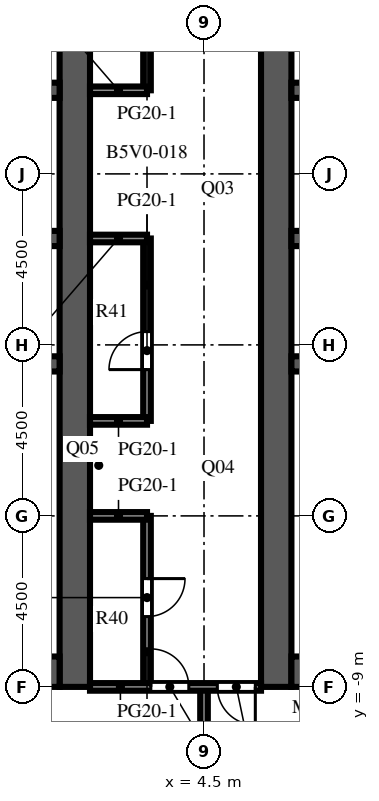
"""IFC4 building model, lengths in metres.
Left out: names, types, materials, properties, quantities, classifications, styles, units other than length and angle.
Written with IfcOpenShell. Run it as: python <this file> out.ifc"""

import sys

from ifc_helpers import new_model, si_unit, direction, frame, frame_2d, origin, place, context, subcontext, project, spatial, rectangle, extrude, element, fill, save


model = new_model("IFC4")
c1 = context("Model", 3, precision=1e-05, world=origin(), true_north=direction((0.0, 1.0)))
c2 = subcontext(c1, "Body", "Model", "MODEL_VIEW")
j1 = project(units=[si_unit("LENGTHUNIT", "METRE"), si_unit("PLANEANGLEUNIT", "RADIAN")], contexts=[c1])
p1 = place(None, origin())
s1 = spatial("IfcSite", under=j1, at=p1, CompositionType="ELEMENT")
p2 = place(p1, origin())
s2 = spatial("IfcBuilding", under=s1, at=p2, CompositionType="ELEMENT")
p3 = place(p2, frame((0.0, 0.0, 160.9)))
s3 = spatial("IfcBuildingStorey", under=s2, at=p3, CompositionType="ELEMENT", Elevation=160.9)
p4 = place(p3, frame((1.1, -9.0, 0.0), z_axis=(0.0, 0.0, 1.0), x_axis=(0.0, 1.0, 0.0)))
e1 = element("IfcWall", 1, at=p4, inside=s3, PredefinedType="SHEAR", context=c2, shape_type="SweptSolid", body=[
    extrude(rectangle(XDim=27.5, YDim=0.8, at=frame_2d((13.75, 0.0))), origin(), (0.0, 0.0, 1.0), 4.1),
])
p5 = place(p4, frame((12.55, 0.0, 0.0)))
e2 = element("IfcOpeningElement", 2, at=p5, cuts=e1, PredefinedType="OPENING", context=c2, shape_type="SweptSolid", body=[
    extrude(rectangle(XDim=2.4, YDim=2.4, at=frame_2d((1.2, 1.2))), frame((0.0, 0.41, 0.0), z_axis=(0.0, -1.0, 0.0), x_axis=(1.0, 0.0, 0.0)), (0.0, 0.0, 1.0), 0.82),
])
p6 = place(p4, frame((5.45, 0.0, 0.0)))
e3 = element("IfcOpeningElement", 3, at=p6, cuts=e1, PredefinedType="OPENING", context=c2, shape_type="SweptSolid", body=[
    extrude(rectangle(XDim=1.2, YDim=2.1, at=frame_2d((0.6, 1.05))), frame((0.0, 0.41, 0.0), z_axis=(0.0, -1.0, 0.0), x_axis=(1.0, 0.0, 0.0)), (0.0, 0.0, 1.0), 0.82),
])
p7 = place(p4, frame((19.45, 0.0, 0.0)))
e4 = element("IfcOpeningElement", 4, at=p7, cuts=e1, PredefinedType="OPENING", context=c2, shape_type="SweptSolid", body=[
    extrude(rectangle(XDim=1.0, YDim=2.1, at=frame_2d((0.5, 1.05))), frame((0.0, 0.41, 0.0), z_axis=(0.0, -1.0, 0.0), x_axis=(1.0, 0.0, 0.0)), (0.0, 0.0, 1.0), 0.82),
])
p8 = place(p4, frame((21.137, 0.0, 0.0)))
e5 = element("IfcOpeningElement", 5, at=p8, cuts=e1, PredefinedType="OPENING", context=c2, shape_type="SweptSolid", body=[
    extrude(rectangle(XDim=1.0, YDim=2.1, at=frame_2d((0.5, 1.05))), frame((0.0, 0.41, 0.0), z_axis=(0.0, -1.0, 0.0), x_axis=(1.0, 0.0, 0.0)), (0.0, 0.0, 1.0), 0.82),
])
p9 = place(p4, frame((23.2, 0.0, 0.0)))
e6 = element("IfcOpeningElement", 6, at=p9, cuts=e1, PredefinedType="OPENING", context=c2, shape_type="SweptSolid", body=[
    extrude(rectangle(XDim=1.0, YDim=2.1, at=frame_2d((0.5, 1.05))), frame((0.0, 0.41, 0.0), z_axis=(0.0, -1.0, 0.0), x_axis=(1.0, 0.0, 0.0)), (0.0, 0.0, 1.0), 0.82),
])
p10 = place(p4, frame((25.262, 0.0, 0.0)))
e7 = element("IfcOpeningElement", 7, at=p10, cuts=e1, PredefinedType="OPENING", context=c2, shape_type="SweptSolid", body=[
    extrude(rectangle(XDim=1.0, YDim=2.1, at=frame_2d((0.5, 1.05))), frame((0.0, 0.41, 0.0), z_axis=(0.0, -1.0, 0.0), x_axis=(1.0, 0.0, 0.0)), (0.0, 0.0, 1.0), 0.82),
])
p11 = place(p3, frame((-9.7, -8.6, 0.0), z_axis=(0.0, 0.0, 1.0), x_axis=(1.0, 0.0, 0.0)))
e8 = element("IfcWall", 8, at=p11, inside=s3, PredefinedType="SHEAR", context=c2, shape_type="SweptSolid", body=[
    extrude(rectangle(XDim=10.4, YDim=0.8, at=frame_2d((5.2, 0.0))), origin(), (0.0, 0.0, 1.0), 4.1),
])
p12 = place(p3, frame((-9.7, -0.5, 0.0), z_axis=(0.0, 0.0, 1.0), x_axis=(1.0, 0.0, 0.0)))
e9 = element("IfcWall", 9, at=p12, inside=s3, PredefinedType="SHEAR", context=c2, shape_type="SweptSolid", body=[
    extrude(rectangle(XDim=10.4, YDim=0.4, at=frame_2d((5.2, 0.0))), origin(), (0.0, 0.0, 1.0), 4.1),
])
p13 = place(p3, frame((-9.7, 2.8, 0.0), z_axis=(0.0, 0.0, 1.0), x_axis=(1.0, 0.0, 0.0)))
e10 = element("IfcWall", 10, at=p13, inside=s3, PredefinedType="SHEAR", context=c2, shape_type="SweptSolid", body=[
    extrude(rectangle(XDim=10.4, YDim=0.4, at=frame_2d((5.2, 0.0))), origin(), (0.0, 0.0, 1.0), 4.1),
])
p14 = place(p13, frame((0.738, 0.0, 0.0)))
e11 = element("IfcOpeningElement", 11, at=p14, cuts=e10, PredefinedType="OPENING", context=c2, shape_type="SweptSolid", body=[
    extrude(rectangle(XDim=1.1, YDim=2.1, at=frame_2d((0.55, 1.05))), frame((0.0, 0.21, 0.0), z_axis=(0.0, -1.0, 0.0), x_axis=(1.0, 0.0, 0.0)), (0.0, 0.0, 1.0), 0.42),
])
p15 = place(p13, frame((3.337, 0.0, 0.0)))
e12 = element("IfcOpeningElement", 12, at=p15, cuts=e10, PredefinedType="OPENING", context=c2, shape_type="SweptSolid", body=[
    extrude(rectangle(XDim=1.1, YDim=2.1, at=frame_2d((0.55, 1.05))), frame((0.0, 0.21, 0.0), z_axis=(0.0, -1.0, 0.0), x_axis=(1.0, 0.0, 0.0)), (0.0, 0.0, 1.0), 0.42),
])
p16 = place(p13, frame((6.012, 0.0, 0.0)))
e13 = element("IfcOpeningElement", 13, at=p16, cuts=e10, PredefinedType="OPENING", context=c2, shape_type="SweptSolid", body=[
    extrude(rectangle(XDim=1.0, YDim=2.1, at=frame_2d((0.5, 1.05))), frame((0.0, 0.21, 0.0), z_axis=(0.0, -1.0, 0.0), x_axis=(1.0, 0.0, 0.0)), (0.0, 0.0, 1.0), 0.42),
])
p17 = place(p13, frame((8.613, 0.0, 0.0)))
e14 = element("IfcOpeningElement", 14, at=p17, cuts=e10, PredefinedType="OPENING", context=c2, shape_type="SweptSolid", body=[
    extrude(rectangle(XDim=1.0, YDim=2.1, at=frame_2d((0.5, 1.05))), frame((0.0, 0.21, 0.0), z_axis=(0.0, -1.0, 0.0), x_axis=(1.0, 0.0, 0.0)), (0.0, 0.0, 1.0), 0.42),
])
p18 = place(p3, frame((-9.7, 6.7, 0.0), z_axis=(0.0, 0.0, 1.0), x_axis=(1.0, 0.0, 0.0)))
e15 = element("IfcWall", 15, at=p18, inside=s3, PredefinedType="SHEAR", context=c2, shape_type="SweptSolid", body=[
    extrude(rectangle(XDim=10.4, YDim=0.4, at=frame_2d((5.2, 0.0))), origin(), (0.0, 0.0, 1.0), 4.1),
])
p19 = place(p18, frame((3.337, 0.0, 0.0)))
e16 = element("IfcOpeningElement", 16, at=p19, cuts=e15, PredefinedType="OPENING", context=c2, shape_type="SweptSolid", body=[
    extrude(rectangle(XDim=1.1, YDim=2.1, at=frame_2d((0.55, 1.05))), frame((0.0, 0.21, 0.0), z_axis=(0.0, -1.0, 0.0), x_axis=(1.0, 0.0, 0.0)), (0.0, 0.0, 1.0), 0.42),
])
p20 = place(p18, frame((5.962, 0.0, 0.0)))
e17 = element("IfcOpeningElement", 17, at=p20, cuts=e15, PredefinedType="OPENING", context=c2, shape_type="SweptSolid", body=[
    extrude(rectangle(XDim=1.1, YDim=2.1, at=frame_2d((0.55, 1.05))), frame((0.0, 0.21, 0.0), z_axis=(0.0, -1.0, 0.0), x_axis=(1.0, 0.0, 0.0)), (0.0, 0.0, 1.0), 0.42),
])
p21 = place(p18, frame((8.663, 0.0, 0.0)))
e18 = element("IfcOpeningElement", 18, at=p21, cuts=e15, PredefinedType="OPENING", context=c2, shape_type="SweptSolid", body=[
    extrude(rectangle(XDim=1.1, YDim=2.1, at=frame_2d((0.55, 1.05))), frame((0.0, 0.21, 0.0), z_axis=(0.0, -1.0, 0.0), x_axis=(1.0, 0.0, 0.0)), (0.0, 0.0, 1.0), 0.42),
])
p22 = place(p18, frame((0.688, 0.0, 0.0)))
e19 = element("IfcOpeningElement", 19, at=p22, cuts=e15, PredefinedType="OPENING", context=c2, shape_type="SweptSolid", body=[
    extrude(rectangle(XDim=1.0, YDim=2.1, at=frame_2d((0.5, 1.05))), frame((0.0, 0.21, 0.0), z_axis=(0.0, -1.0, 0.0), x_axis=(1.0, 0.0, 0.0)), (0.0, 0.0, 1.0), 0.42),
])
p23 = place(p3, frame((6.4, -9.0, 0.0), z_axis=(0.0, 0.0, 1.0), x_axis=(0.0, 1.0, 0.0)))
e20 = element("IfcWall", 20, at=p23, inside=s3, PredefinedType="SHEAR", context=c2, shape_type="SweptSolid", body=[
    extrude(rectangle(XDim=27.5, YDim=0.8, at=frame_2d((13.75, 0.0))), origin(), (0.0, 0.0, 1.0), 4.1),
])
p24 = place(p23, frame((12.55, 0.0, 0.0)))
e21 = element("IfcOpeningElement", 21, at=p24, cuts=e20, PredefinedType="OPENING", context=c2, shape_type="SweptSolid", body=[
    extrude(rectangle(XDim=2.4, YDim=2.4, at=frame_2d((1.2, 1.2))), frame((0.0, 0.41, 0.0), z_axis=(0.0, -1.0, 0.0), x_axis=(1.0, 0.0, 0.0)), (0.0, 0.0, 1.0), 0.82),
])
p25 = place(p23, frame((5.45, 0.0, 0.0)))
e22 = element("IfcOpeningElement", 22, at=p25, cuts=e20, PredefinedType="OPENING", context=c2, shape_type="SweptSolid", body=[
    extrude(rectangle(XDim=1.2, YDim=2.1, at=frame_2d((0.6, 1.05))), frame((0.0, 0.41, 0.0), z_axis=(0.0, -1.0, 0.0), x_axis=(1.0, 0.0, 0.0)), (0.0, 0.0, 1.0), 0.82),
])
p26 = place(p23, frame((19.45, 0.0, 0.0)))
e23 = element("IfcOpeningElement", 23, at=p26, cuts=e20, PredefinedType="OPENING", context=c2, shape_type="SweptSolid", body=[
    extrude(rectangle(XDim=1.0, YDim=2.1, at=frame_2d((0.5, 1.05))), frame((0.0, 0.41, 0.0), z_axis=(0.0, -1.0, 0.0), x_axis=(1.0, 0.0, 0.0)), (0.0, 0.0, 1.0), 0.82),
])
p27 = place(p23, frame((21.137, 0.0, 0.0)))
e24 = element("IfcOpeningElement", 24, at=p27, cuts=e20, PredefinedType="OPENING", context=c2, shape_type="SweptSolid", body=[
    extrude(rectangle(XDim=1.0, YDim=2.1, at=frame_2d((0.5, 1.05))), frame((0.0, 0.41, 0.0), z_axis=(0.0, -1.0, 0.0), x_axis=(1.0, 0.0, 0.0)), (0.0, 0.0, 1.0), 0.82),
])
p28 = place(p23, frame((23.2, 0.0, 0.0)))
e25 = element("IfcOpeningElement", 25, at=p28, cuts=e20, PredefinedType="OPENING", context=c2, shape_type="SweptSolid", body=[
    extrude(rectangle(XDim=1.0, YDim=2.1, at=frame_2d((0.5, 1.05))), frame((0.0, 0.41, 0.0), z_axis=(0.0, -1.0, 0.0), x_axis=(1.0, 0.0, 0.0)), (0.0, 0.0, 1.0), 0.82),
])
p29 = place(p23, frame((25.262, 0.0, 0.0)))
e26 = element("IfcOpeningElement", 26, at=p29, cuts=e20, PredefinedType="OPENING", context=c2, shape_type="SweptSolid", body=[
    extrude(rectangle(XDim=1.0, YDim=2.1, at=frame_2d((0.5, 1.05))), frame((0.0, 0.41, 0.0), z_axis=(0.0, -1.0, 0.0), x_axis=(1.0, 0.0, 0.0)), (0.0, 0.0, 1.0), 0.82),
])
p30 = place(p3, frame((6.8, -8.6, 0.0), z_axis=(0.0, 0.0, 1.0), x_axis=(1.0, 0.0, 0.0)))
e27 = element("IfcWall", 27, at=p30, inside=s3, PredefinedType="SHEAR", context=c2, shape_type="SweptSolid", body=[
    extrude(rectangle(XDim=10.4, YDim=0.8, at=frame_2d((5.2, 0.0))), origin(), (0.0, 0.0, 1.0), 4.1),
])
p31 = place(p3, frame((6.8, -0.5, 0.0), z_axis=(0.0, 0.0, 1.0), x_axis=(1.0, 0.0, 0.0)))
e28 = element("IfcWall", 28, at=p31, inside=s3, PredefinedType="SHEAR", context=c2, shape_type="SweptSolid", body=[
    extrude(rectangle(XDim=10.4, YDim=0.4, at=frame_2d((5.2, 0.0))), origin(), (0.0, 0.0, 1.0), 4.1),
])
p32 = place(p3, frame((6.8, 2.8, 0.0), z_axis=(0.0, 0.0, 1.0), x_axis=(1.0, 0.0, 0.0)))
e29 = element("IfcWall", 29, at=p32, inside=s3, PredefinedType="SHEAR", context=c2, shape_type="SweptSolid", body=[
    extrude(rectangle(XDim=10.4, YDim=0.4, at=frame_2d((5.2, 0.0))), origin(), (0.0, 0.0, 1.0), 4.1),
])
p33 = place(p32, frame((0.738, 0.0, 0.0)))
e30 = element("IfcOpeningElement", 30, at=p33, cuts=e29, PredefinedType="OPENING", context=c2, shape_type="SweptSolid", body=[
    extrude(rectangle(XDim=1.1, YDim=2.1, at=frame_2d((0.55, 1.05))), frame((0.0, 0.21, 0.0), z_axis=(0.0, -1.0, 0.0), x_axis=(1.0, 0.0, 0.0)), (0.0, 0.0, 1.0), 0.42),
])
p34 = place(p32, frame((3.337, 0.0, 0.0)))
e31 = element("IfcOpeningElement", 31, at=p34, cuts=e29, PredefinedType="OPENING", context=c2, shape_type="SweptSolid", body=[
    extrude(rectangle(XDim=1.1, YDim=2.1, at=frame_2d((0.55, 1.05))), frame((0.0, 0.21, 0.0), z_axis=(0.0, -1.0, 0.0), x_axis=(1.0, 0.0, 0.0)), (0.0, 0.0, 1.0), 0.42),
])
p35 = place(p32, frame((6.012, 0.0, 0.0)))
e32 = element("IfcOpeningElement", 32, at=p35, cuts=e29, PredefinedType="OPENING", context=c2, shape_type="SweptSolid", body=[
    extrude(rectangle(XDim=1.0, YDim=2.1, at=frame_2d((0.5, 1.05))), frame((0.0, 0.21, 0.0), z_axis=(0.0, -1.0, 0.0), x_axis=(1.0, 0.0, 0.0)), (0.0, 0.0, 1.0), 0.42),
])
p36 = place(p32, frame((8.613, 0.0, 0.0)))
e33 = element("IfcOpeningElement", 33, at=p36, cuts=e29, PredefinedType="OPENING", context=c2, shape_type="SweptSolid", body=[
    extrude(rectangle(XDim=1.0, YDim=2.1, at=frame_2d((0.5, 1.05))), frame((0.0, 0.21, 0.0), z_axis=(0.0, -1.0, 0.0), x_axis=(1.0, 0.0, 0.0)), (0.0, 0.0, 1.0), 0.42),
])
p37 = place(p3, frame((6.8, 6.7, 0.0), z_axis=(0.0, 0.0, 1.0), x_axis=(1.0, 0.0, 0.0)))
e34 = element("IfcWall", 34, at=p37, inside=s3, PredefinedType="SHEAR", context=c2, shape_type="SweptSolid", body=[
    extrude(rectangle(XDim=10.4, YDim=0.4, at=frame_2d((5.2, 0.0))), origin(), (0.0, 0.0, 1.0), 4.1),
])
p38 = place(p37, frame((3.337, 0.0, 0.0)))
e35 = element("IfcOpeningElement", 35, at=p38, cuts=e34, PredefinedType="OPENING", context=c2, shape_type="SweptSolid", body=[
    extrude(rectangle(XDim=1.1, YDim=2.1, at=frame_2d((0.55, 1.05))), frame((0.0, 0.21, 0.0), z_axis=(0.0, -1.0, 0.0), x_axis=(1.0, 0.0, 0.0)), (0.0, 0.0, 1.0), 0.42),
])
p39 = place(p37, frame((5.962, 0.0, 0.0)))
e36 = element("IfcOpeningElement", 36, at=p39, cuts=e34, PredefinedType="OPENING", context=c2, shape_type="SweptSolid", body=[
    extrude(rectangle(XDim=1.1, YDim=2.1, at=frame_2d((0.55, 1.05))), frame((0.0, 0.21, 0.0), z_axis=(0.0, -1.0, 0.0), x_axis=(1.0, 0.0, 0.0)), (0.0, 0.0, 1.0), 0.42),
])
p40 = place(p37, frame((8.663, 0.0, 0.0)))
e37 = element("IfcOpeningElement", 37, at=p40, cuts=e34, PredefinedType="OPENING", context=c2, shape_type="SweptSolid", body=[
    extrude(rectangle(XDim=1.1, YDim=2.1, at=frame_2d((0.55, 1.05))), frame((0.0, 0.21, 0.0), z_axis=(0.0, -1.0, 0.0), x_axis=(1.0, 0.0, 0.0)), (0.0, 0.0, 1.0), 0.42),
])
p41 = place(p37, frame((0.688, 0.0, 0.0)))
e38 = element("IfcOpeningElement", 38, at=p41, cuts=e34, PredefinedType="OPENING", context=c2, shape_type="SweptSolid", body=[
    extrude(rectangle(XDim=1.0, YDim=2.1, at=frame_2d((0.5, 1.05))), frame((0.0, 0.21, 0.0), z_axis=(0.0, -1.0, 0.0), x_axis=(1.0, 0.0, 0.0)), (0.0, 0.0, 1.0), 0.42),
])
p42 = place(p3, frame((-0.8, -5.2, 0.0), z_axis=(0.0, 0.0, 1.0), x_axis=(1.0, 0.0, 0.0)))
e39 = element("IfcWall", 39, at=p42, inside=s3, PredefinedType="PARTITIONING", context=c2, shape_type="SweptSolid", body=[
    extrude(rectangle(XDim=1.5, YDim=0.1, at=frame_2d((0.75, 0.0))), origin(), (0.0, 0.0, 1.0), 3.65),
])
p43 = place(p42, frame((0.25, 0.0, 0.0)))
e40 = element("IfcOpeningElement", 40, at=p43, cuts=e39, PredefinedType="OPENING", context=c2, shape_type="SweptSolid", body=[
    extrude(rectangle(XDim=1.0, YDim=2.1, at=frame_2d((0.5, 1.05))), frame((0.0, 0.06, 0.0), z_axis=(0.0, -1.0, 0.0), x_axis=(1.0, 0.0, 0.0)), (0.0, 0.0, 1.0), 0.12),
])
p44 = place(p3, frame((6.8, -5.2, 0.0), z_axis=(0.0, 0.0, 1.0), x_axis=(1.0, 0.0, 0.0)))
e41 = element("IfcWall", 41, at=p44, inside=s3, PredefinedType="PARTITIONING", context=c2, shape_type="SweptSolid", body=[
    extrude(rectangle(XDim=1.5, YDim=0.1, at=frame_2d((0.75, 0.0))), origin(), (0.0, 0.0, 1.0), 3.65),
])
p45 = place(p44, frame((0.25, 0.0, 0.0)))
e42 = element("IfcOpeningElement", 42, at=p45, cuts=e41, PredefinedType="OPENING", context=c2, shape_type="SweptSolid", body=[
    extrude(rectangle(XDim=1.0, YDim=2.1, at=frame_2d((0.5, 1.05))), frame((0.0, 0.06, 0.0), z_axis=(0.0, -1.0, 0.0), x_axis=(1.0, 0.0, 0.0)), (0.0, 0.0, 1.0), 0.12),
])
p46 = place(p3, frame((3.0, -9.0, 0.0), z_axis=(0.0, 0.0, 1.0), x_axis=(0.0, 1.0, 0.0)))
e43 = element("IfcWall", 43, at=p46, inside=s3, PredefinedType="PARTITIONING", context=c2, shape_type="SweptSolid", body=[
    extrude(rectangle(XDim=4.5, YDim=0.2, at=frame_2d((2.25, 0.0))), origin(), (0.0, 0.0, 1.0), 3.65),
])
p47 = place(p46, frame((1.85, 0.0, 0.0)))
e44 = element("IfcOpeningElement", 44, at=p47, cuts=e43, PredefinedType="OPENING", context=c2, shape_type="SweptSolid", body=[
    extrude(rectangle(XDim=1.0, YDim=2.1, at=frame_2d((0.5, 1.05))), frame((0.0, 0.11, 0.0), z_axis=(0.0, -1.0, 0.0), x_axis=(1.0, 0.0, 0.0)), (0.0, 0.0, 1.0), 0.22),
])
p48 = place(p3, frame((3.0, -2.0, 0.0), z_axis=(0.0, 0.0, 1.0), x_axis=(0.0, 1.0, 0.0)))
e45 = element("IfcWall", 45, at=p48, inside=s3, PredefinedType="PARTITIONING", context=c2, shape_type="SweptSolid", body=[
    extrude(rectangle(XDim=4.8, YDim=0.2, at=frame_2d((2.4, 0.0))), origin(), (0.0, 0.0, 1.0), 3.65),
])
p49 = place(p48, frame((1.35, 0.0, 0.0)))
e46 = element("IfcOpeningElement", 46, at=p49, cuts=e45, PredefinedType="OPENING", context=c2, shape_type="SweptSolid", body=[
    extrude(rectangle(XDim=1.0, YDim=2.1, at=frame_2d((0.5, 1.05))), frame((0.0, 0.11, 0.0), z_axis=(0.0, -1.0, 0.0), x_axis=(1.0, 0.0, 0.0)), (0.0, 0.0, 1.0), 0.22),
])
p50 = place(p3, frame((3.0, 6.7, 0.0), z_axis=(0.0, 0.0, 1.0), x_axis=(0.0, 1.0, 0.0)))
e47 = element("IfcWall", 47, at=p50, inside=s3, PredefinedType="PARTITIONING", context=c2, shape_type="SweptSolid", body=[
    extrude(rectangle(XDim=11.8, YDim=0.2, at=frame_2d((5.9, 0.0))), origin(), (0.0, 0.0, 1.0), 3.65),
])
p51 = place(p50, frame((6.35, 0.0, 0.0)))
e48 = element("IfcOpeningElement", 48, at=p51, cuts=e47, PredefinedType="OPENING", context=c2, shape_type="SweptSolid", body=[
    extrude(rectangle(XDim=1.0, YDim=2.1, at=frame_2d((0.5, 1.05))), frame((0.0, 0.11, 0.0), z_axis=(0.0, -1.0, 0.0), x_axis=(1.0, 0.0, 0.0)), (0.0, 0.0, 1.0), 0.22),
])
p52 = place(p3, frame((4.5, -26.5, 0.0), z_axis=(0.0, 0.0, 1.0), x_axis=(0.0, 1.0, 0.0)))
e49 = element("IfcWall", 49, at=p52, inside=s3, PredefinedType="PARTITIONING", context=c2, shape_type="SweptSolid", body=[
    extrude(rectangle(XDim=17.5, YDim=0.2, at=frame_2d((8.75, 0.0))), origin(), (0.0, 0.0, 1.0), 3.65),
])
p53 = place(p3, frame((6.0, -9.0, 0.0), z_axis=(0.0, 0.0, 1.0), x_axis=(-1.0, 0.0, 0.0)))
e50 = element("IfcWall", 50, at=p53, inside=s3, PredefinedType="PARTITIONING", context=c2, shape_type="SweptSolid", body=[
    extrude(rectangle(XDim=4.5, YDim=0.2, at=frame_2d((2.25, 0.0))), origin(), (0.0, 0.0, 1.0), 3.65),
])
p54 = place(p53, frame((1.9, 0.0, 0.0)))
e51 = element("IfcOpeningElement", 51, at=p54, cuts=e50, PredefinedType="OPENING", context=c2, shape_type="SweptSolid", body=[
    extrude(rectangle(XDim=1.0, YDim=2.1, at=frame_2d((0.5, 1.05))), frame((0.0, 0.11, 0.0), z_axis=(0.0, -1.0, 0.0), x_axis=(1.0, 0.0, 0.0)), (0.0, 0.0, 1.0), 0.22),
])
p55 = place(p53, frame((0.15, 0.0, 0.0)))
e52 = element("IfcOpeningElement", 52, at=p55, cuts=e50, PredefinedType="OPENING", context=c2, shape_type="SweptSolid", body=[
    extrude(rectangle(XDim=1.0, YDim=2.1, at=frame_2d((0.5, 1.05))), frame((0.0, 0.11, 0.0), z_axis=(0.0, -1.0, 0.0), x_axis=(1.0, 0.0, 0.0)), (0.0, 0.0, 1.0), 0.22),
])
for number, where, z_axis, x_axis in (
    (53, (1.5, -4.5, 0.0), (0.0, 0.0, 1.0), (1.0, 0.0, 0.0)),
    (54, (1.5, -2.0, 0.0), (0.0, 0.0, 1.0), (1.0, 0.0, 0.0)),
    (55, (1.5, 2.8, 0.0), (0.0, 0.0, 1.0), (1.0, 0.0, 0.0)),
    (56, (1.5, 6.7, 0.0), (0.0, 0.0, 1.0), (1.0, 0.0, 0.0)),
):
    element("IfcWall", number, at=place(p3, frame(where, z_axis=z_axis, x_axis=x_axis)), inside=s3, PredefinedType="PARTITIONING", context=c2, shape_type="SweptSolid", body=[
        extrude(rectangle(XDim=1.5, YDim=0.2, at=frame_2d((0.75, 0.0))), origin(), (0.0, 0.0, 1.0), 3.65),
    ])
p56 = place(p5, origin())
e57 = element("IfcDoor", 57, at=p56, inside=s3, OperationType="DOUBLE_DOOR_DOUBLE_SWING", PredefinedType="DOOR", context=c2, shape_type="SweptSolid", body=[
    extrude(rectangle(XDim=2.4, YDim=2.4, at=frame_2d((1.2, 1.2))), frame((0.0, 0.025, 0.0), z_axis=(0.0, -1.0, 0.0), x_axis=(1.0, 0.0, 0.0)), (0.0, 0.0, 1.0), 0.05),
])
fill(e2, e57)
p57 = place(p24, origin())
e58 = element("IfcDoor", 58, at=p57, inside=s3, OperationType="DOUBLE_DOOR_DOUBLE_SWING", PredefinedType="DOOR", context=c2, shape_type="SweptSolid", body=[
    extrude(rectangle(XDim=2.4, YDim=2.4, at=frame_2d((1.2, 1.2))), frame((0.0, 0.025, 0.0), z_axis=(0.0, -1.0, 0.0), x_axis=(1.0, 0.0, 0.0)), (0.0, 0.0, 1.0), 0.05),
])
fill(e21, e58)
p58 = place(p6, origin())
e59 = element("IfcDoor", 59, at=p58, inside=s3, OperationType="SINGLE_SWING_LEFT", PredefinedType="DOOR", context=c2, shape_type="SweptSolid", body=[
    extrude(rectangle(XDim=1.2, YDim=2.1, at=frame_2d((0.6, 1.05))), frame((0.0, 0.375, 0.0), z_axis=(0.0, -1.0, 0.0), x_axis=(1.0, 0.0, 0.0)), (0.0, 0.0, 1.0), 0.05),
])
fill(e3, e59)
p59 = place(p25, origin())
e60 = element("IfcDoor", 60, at=p59, inside=s3, OperationType="SINGLE_SWING_RIGHT", PredefinedType="DOOR", context=c2, shape_type="SweptSolid", body=[
    extrude(rectangle(XDim=1.2, YDim=2.1, at=frame_2d((0.6, 1.05))), frame((0.0, -0.325, 0.0), z_axis=(0.0, -1.0, 0.0), x_axis=(1.0, 0.0, 0.0)), (0.0, 0.0, 1.0), 0.05),
])
fill(e22, e60)
p60 = place(p54, origin())
e61 = element("IfcDoor", 61, at=p60, inside=s3, OperationType="SINGLE_SWING_RIGHT", PredefinedType="DOOR", context=c2, shape_type="SweptSolid", body=[
    extrude(rectangle(XDim=1.0, YDim=2.1, at=frame_2d((0.5, 1.05))), frame((0.0, 0.025, 0.0), z_axis=(0.0, -1.0, 0.0), x_axis=(1.0, 0.0, 0.0)), (0.0, 0.0, 1.0), 0.05),
])
fill(e51, e61)
p61 = place(p55, origin())
e62 = element("IfcDoor", 62, at=p61, inside=s3, OperationType="SINGLE_SWING_LEFT", PredefinedType="DOOR", context=c2, shape_type="SweptSolid", body=[
    extrude(rectangle(XDim=1.0, YDim=2.1, at=frame_2d((0.5, 1.05))), frame((0.0, 0.025, 0.0), z_axis=(0.0, -1.0, 0.0), x_axis=(1.0, 0.0, 0.0)), (0.0, 0.0, 1.0), 0.05),
])
fill(e52, e62)
p62 = place(p47, origin())
e63 = element("IfcDoor", 63, at=p62, inside=s3, OperationType="SINGLE_SWING_RIGHT", PredefinedType="DOOR", context=c2, shape_type="SweptSolid", body=[
    extrude(rectangle(XDim=1.0, YDim=2.1, at=frame_2d((0.5, 1.05))), frame((0.0, 0.025, 0.0), z_axis=(0.0, -1.0, 0.0), x_axis=(1.0, 0.0, 0.0)), (0.0, 0.0, 1.0), 0.05),
])
fill(e44, e63)
p63 = place(p49, origin())
e64 = element("IfcDoor", 64, at=p63, inside=s3, OperationType="SINGLE_SWING_LEFT", PredefinedType="DOOR", context=c2, shape_type="SweptSolid", body=[
    extrude(rectangle(XDim=1.0, YDim=2.1, at=frame_2d((0.5, 1.05))), frame((0.0, 0.025, 0.0), z_axis=(0.0, -1.0, 0.0), x_axis=(1.0, 0.0, 0.0)), (0.0, 0.0, 1.0), 0.05),
])
fill(e46, e64)
save(model, sys.argv[1])
